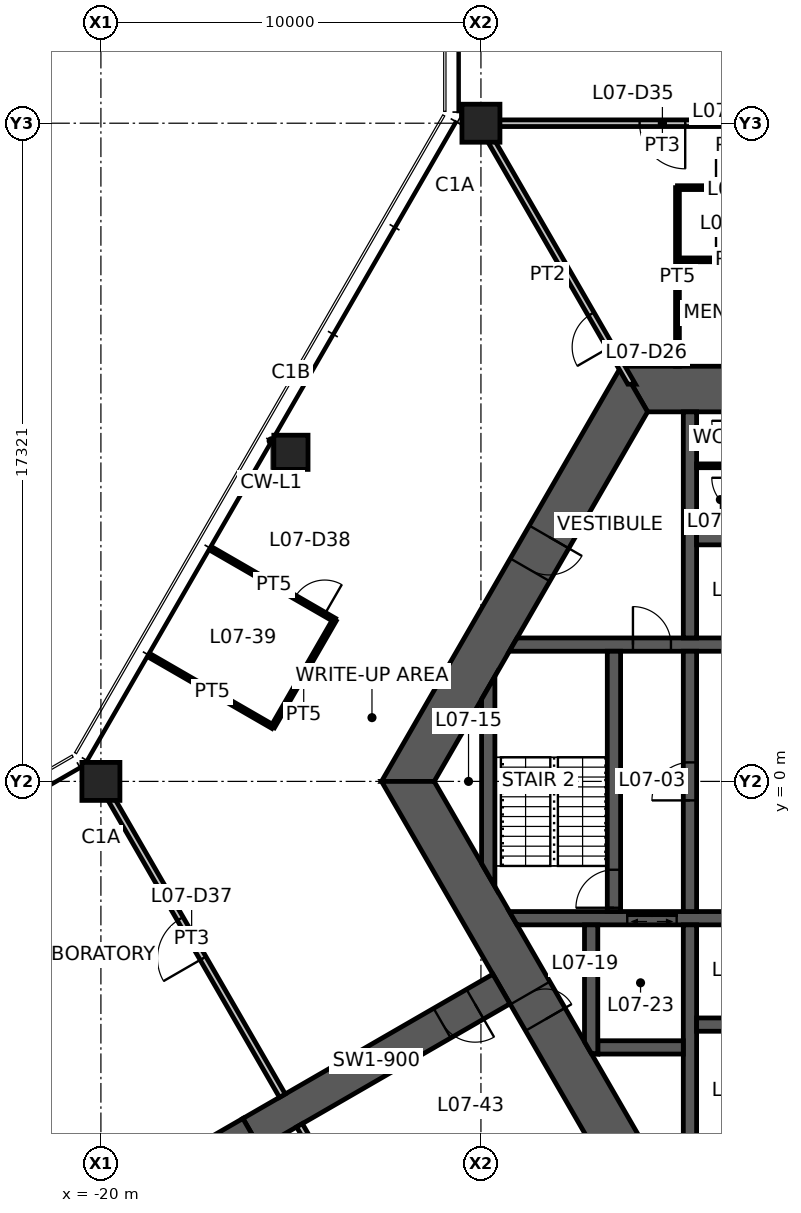
"""IFC4 building model, lengths in metres.
Left out: names, types, materials, properties, quantities, classifications, styles, units other than length and angle.
Written with IfcOpenShell. Run it as: python <this file> out.ifc"""

import sys

from ifc_helpers import new_model, si_unit, direction, frame, frame_2d, origin, origin_2d, place, context, subcontext, project, spatial, polyline, rectangle, hollow_rectangle, outline, extrude, element, fill, save


model = new_model("IFC4")
c1 = context("Model", 3, precision=1e-05, world=origin(), true_north=direction((0.0, 1.0)))
c2 = subcontext(c1, "Body", "Model", "MODEL_VIEW")
j1 = project(units=[si_unit("LENGTHUNIT", "METRE"), si_unit("PLANEANGLEUNIT", "RADIAN")], contexts=[c1])
p1 = place(None, origin())
s1 = spatial("IfcSite", under=j1, at=p1, CompositionType="ELEMENT")
p2 = place(p1, origin())
s2 = spatial("IfcBuilding", under=s1, at=p2, CompositionType="ELEMENT")
p3 = place(p2, frame((0.0, 0.0, 26.8)))
s3 = spatial("IfcBuildingStorey", under=s2, at=p3, CompositionType="ELEMENT", Elevation=26.8)
for number, where, z_axis, x_axis in (
    (1, (-10.0, 17.321, 0.0), (0.0, 0.0, 1.0), (1.0, 0.0, 0.0)),
    (2, (-20.0, 0.0, 0.0), (0.0, 0.0, 1.0), (1.0, 0.0, 0.0)),
):
    element("IfcColumn", number, at=place(p3, frame(where, z_axis=z_axis, x_axis=x_axis)), inside=s3, PredefinedType="COLUMN", context=c2, shape_type="SweptSolid", body=[
        extrude(hollow_rectangle(XDim=1.0, YDim=1.0, WallThickness=0.06, at=origin_2d()), origin(), (0.0, 0.0, 1.0), 4.2),
    ])
p4 = place(p3, frame((-15.0, 8.66, 0.0), z_axis=(0.0, 0.0, 1.0), x_axis=(1.0, 0.0, 0.0)))
e3 = element("IfcColumn", 3, at=p4, inside=s3, PredefinedType="COLUMN", context=c2, shape_type="SweptSolid", body=[
    extrude(hollow_rectangle(XDim=0.9, YDim=0.9, WallThickness=0.05, at=origin_2d()), origin(), (0.0, 0.0, 1.0), 4.2),
])
p5 = place(p3, frame((5.961, 10.325, 0.0), z_axis=(0.0, 0.0, 1.0), x_axis=(-1.0, 0.0, 0.0)))
e4 = element("IfcWall", 4, at=p5, inside=s3, PredefinedType="SHEAR", context=c2, shape_type="SweptSolid", body=[
    extrude(outline(polyline([(-0.346, -0.6), (4.574, -0.6), (5.474, -0.6), (6.449, -0.6), (7.349, -0.6), (12.269, -0.6), (11.576, 0.6), (7.349, 0.6), (6.449, 0.6), (5.474, 0.6), (4.574, 0.6), (0.346, 0.6), (-0.346, -0.6)])), origin(), (0.0, 0.0, 1.0), 4.2),
])
p6 = place(p5, frame((6.449, 0.0, 0.0)))
e5 = element("IfcOpeningElement", 5, at=p6, cuts=e4, PredefinedType="OPENING", context=c2, shape_type="SweptSolid", body=[
    extrude(rectangle(XDim=0.9, YDim=2.1, at=frame_2d((0.45, 1.05))), frame((0.0, 0.61, 0.0), z_axis=(0.0, -1.0, 0.0), x_axis=(1.0, 0.0, 0.0)), (0.0, 0.0, 1.0), 1.22),
])
p7 = place(p5, frame((4.574, 0.0, 0.0)))
e6 = element("IfcOpeningElement", 6, at=p7, cuts=e4, PredefinedType="OPENING", context=c2, shape_type="SweptSolid", body=[
    extrude(rectangle(XDim=0.9, YDim=2.1, at=frame_2d((0.45, 1.05))), frame((0.0, 0.61, 0.0), z_axis=(0.0, -1.0, 0.0), x_axis=(1.0, 0.0, 0.0)), (0.0, 0.0, 1.0), 1.22),
])
p8 = place(p3, frame((-5.961, 10.325, 0.0), z_axis=(0.0, 0.0, 1.0), x_axis=(-0.500004296715, -0.866022923061, 0.0)))
e7 = element("IfcWall", 7, at=p8, inside=s3, PredefinedType="SHEAR", context=c2, shape_type="SweptSolid", body=[
    extrude(outline(polyline([(-0.346, -0.6), (4.494, -0.6), (5.494, -0.6), (12.269, -0.6), (11.576, 0.6), (5.494, 0.6), (4.494, 0.6), (0.346, 0.6), (-0.346, -0.6)])), origin(), (0.0, 0.0, 1.0), 4.2),
])
p9 = place(p8, frame((4.494, 0.0, 0.0)))
e8 = element("IfcOpeningElement", 8, at=p9, cuts=e7, PredefinedType="OPENING", context=c2, shape_type="SweptSolid", body=[
    extrude(rectangle(XDim=1.0, YDim=2.1, at=frame_2d((0.5, 1.05))), frame((0.0, 0.61, 0.0), z_axis=(0.0, -1.0, 0.0), x_axis=(1.0, 0.0, 0.0)), (0.0, 0.0, 1.0), 1.22),
])
p10 = place(p3, frame((-11.922, 0.0, 0.0), z_axis=(0.0, 0.0, 1.0), x_axis=(0.500004296715, -0.866022923061, 0.0)))
e9 = element("IfcWall", 9, at=p10, inside=s3, PredefinedType="SHEAR", context=c2, shape_type="SweptSolid", body=[
    extrude(outline(polyline([(-0.346, -0.6), (6.431, -0.6), (7.231, -0.6), (12.269, -0.6), (11.576, 0.6), (7.231, 0.6), (6.431, 0.6), (0.346, 0.6), (-0.346, -0.6)])), origin(), (0.0, 0.0, 1.0), 4.2),
])
p11 = place(p10, frame((6.431, 0.0, 0.0)))
e10 = element("IfcOpeningElement", 10, at=p11, cuts=e9, PredefinedType="OPENING", context=c2, shape_type="SweptSolid", body=[
    extrude(rectangle(XDim=0.8, YDim=2.1, at=frame_2d((0.4, 1.05))), frame((0.0, 0.61, 0.0), z_axis=(0.0, -1.0, 0.0), x_axis=(1.0, 0.0, 0.0)), (0.0, 0.0, 1.0), 1.22),
])
p12 = place(p3, frame((-9.461, -5.462, 0.0), z_axis=(0.0, 0.0, 1.0), x_axis=(-0.866019116917, -0.500010889016, 0.0)))
e11 = element("IfcWall", 11, at=p12, inside=s3, PredefinedType="SHEAR", context=c2, shape_type="SweptSolid", body=[
    extrude(rectangle(XDim=7.595, YDim=0.9, at=frame_2d((3.798, 0.0))), origin(), (0.0, 0.0, 1.0), 4.2),
])
p13 = place(p12, frame((0.8, 0.0, 0.0)))
e12 = element("IfcOpeningElement", 12, at=p13, cuts=e11, PredefinedType="OPENING", context=c2, shape_type="SweptSolid", body=[
    extrude(rectangle(XDim=1.0, YDim=2.1, at=frame_2d((0.5, 1.05))), frame((0.0, 0.46, 0.0), z_axis=(0.0, -1.0, 0.0), x_axis=(1.0, 0.0, 0.0)), (0.0, 0.0, 1.0), 0.92),
])
p14 = place(p3, frame((-16.039, -9.26, 0.0), z_axis=(0.0, 0.0, 1.0), x_axis=(-0.866024837091, -0.50000098154, 0.0)))
e13 = element("IfcWall", 13, at=p14, inside=s3, PredefinedType="SHEAR", context=c2, shape_type="SweptSolid", body=[
    extrude(rectangle(XDim=13.0, YDim=0.9, at=frame_2d((6.5, 0.0))), origin(), (0.0, 0.0, 1.0), 4.2),
])
p15 = place(p3, frame((-9.151, 3.6, 0.0), z_axis=(0.0, 0.0, 1.0), x_axis=(1.0, 0.0, 0.0)))
e14 = element("IfcWall", 14, at=p15, inside=s3, PredefinedType="SHEAR", context=c2, shape_type="SweptSolid", body=[
    extrude(outline(polyline([(-0.101, -0.175), (3.151, -0.175), (4.151, -0.175), (7.726, -0.175), (7.726, 0.175), (4.151, 0.175), (3.151, 0.175), (0.101, 0.175), (-0.101, -0.175)])), origin(), (0.0, 0.0, 1.0), 4.2),
])
p16 = place(p15, frame((3.151, 0.0, 0.0)))
e15 = element("IfcOpeningElement", 15, at=p16, cuts=e14, PredefinedType="OPENING", context=c2, shape_type="SweptSolid", body=[
    extrude(rectangle(XDim=1.0, YDim=2.1, at=frame_2d((0.5, 1.05))), frame((0.0, 0.185, 0.0), z_axis=(0.0, -1.0, 0.0), x_axis=(1.0, 0.0, 0.0)), (0.0, 0.0, 1.0), 0.37),
])
p17 = place(p3, frame((-9.151, -3.6, 0.0), z_axis=(0.0, 0.0, 1.0), x_axis=(1.0, 0.0, 0.0)))
e16 = element("IfcWall", 16, at=p17, inside=s3, PredefinedType="SHEAR", context=c2, shape_type="SweptSolid", body=[
    extrude(outline(polyline([(0.101, -0.175), (3.001, -0.175), (4.301, -0.175), (7.726, -0.175), (7.726, 0.175), (4.301, 0.175), (3.001, 0.175), (-0.101, 0.175), (0.101, -0.175)])), origin(), (0.0, 0.0, 1.0), 4.2),
])
p18 = place(p17, frame((3.001, 0.0, 0.0)))
e17 = element("IfcOpeningElement", 17, at=p18, cuts=e16, PredefinedType="OPENING", context=c2, shape_type="SweptSolid", body=[
    extrude(rectangle(XDim=1.3, YDim=2.1, at=frame_2d((0.65, 1.05))), frame((0.0, 0.185, 0.0), z_axis=(0.0, -1.0, 0.0), x_axis=(1.0, 0.0, 0.0)), (0.0, 0.0, 1.0), 0.37),
])
p19 = place(p3, frame((-4.5, -3.425, 0.0), z_axis=(0.0, 0.0, 1.0), x_axis=(0.0, 1.0, 0.0)))
e18 = element("IfcWall", 18, at=p19, inside=s3, PredefinedType="SHEAR", context=c2, shape_type="SweptSolid", body=[
    extrude(rectangle(XDim=6.85, YDim=0.35, at=frame_2d((3.425, 0.0))), origin(), (0.0, 0.0, 1.0), 4.2),
])
p20 = place(p19, frame((2.925, 0.0, 0.0)))
e19 = element("IfcOpeningElement", 19, at=p20, cuts=e18, PredefinedType="OPENING", context=c2, shape_type="SweptSolid", body=[
    extrude(rectangle(XDim=1.0, YDim=2.1, at=frame_2d((0.5, 1.05))), frame((0.0, 0.185, 0.0), z_axis=(0.0, -1.0, 0.0), x_axis=(1.0, 0.0, 0.0)), (0.0, 0.0, 1.0), 0.37),
])
p21 = place(p3, frame((-6.5, -3.425, 0.0), z_axis=(0.0, 0.0, 1.0), x_axis=(0.0, 1.0, 0.0)))
e20 = element("IfcWall", 20, at=p21, inside=s3, PredefinedType="SHEAR", context=c2, shape_type="SweptSolid", body=[
    extrude(rectangle(XDim=6.85, YDim=0.35, at=frame_2d((3.425, 0.0))), origin(), (0.0, 0.0, 1.0), 4.2),
])
p22 = place(p21, frame((0.1, 0.0, 0.0)))
e21 = element("IfcOpeningElement", 21, at=p22, cuts=e20, PredefinedType="OPENING", context=c2, shape_type="SweptSolid", body=[
    extrude(rectangle(XDim=1.0, YDim=2.1, at=frame_2d((0.5, 1.05))), frame((0.0, 0.185, 0.0), z_axis=(0.0, -1.0, 0.0), x_axis=(1.0, 0.0, 0.0)), (0.0, 0.0, 1.0), 0.37),
])
for number, where, z_axis, x_axis in (
    (22, (-4.5, 3.775, 0.0), (0.0, 0.0, 1.0), (0.0, 1.0, 0.0)),
    (23, (-4.5, -3.775, 0.0), (0.0, 0.0, 1.0), (0.0, -1.0, 0.0)),
):
    element("IfcWall", number, at=place(p3, frame(where, z_axis=z_axis, x_axis=x_axis)), inside=s3, PredefinedType="SHEAR", context=c2, shape_type="SweptSolid", body=[
        extrude(rectangle(XDim=5.95, YDim=0.35, at=frame_2d((2.975, 0.0))), origin(), (0.0, 0.0, 1.0), 4.2),
    ])
for number, where, z_axis, x_axis in (
    (24, (-4.325, 6.4, 0.0), (0.0, 0.0, 1.0), (1.0, 0.0, 0.0)),
    (25, (-4.325, -6.4, 0.0), (0.0, 0.0, 1.0), (1.0, 0.0, 0.0)),
):
    element("IfcWall", number, at=place(p3, frame(where, z_axis=z_axis, x_axis=x_axis)), inside=s3, PredefinedType="SHEAR", context=c2, shape_type="SweptSolid", body=[
        extrude(rectangle(XDim=2.55, YDim=0.35, at=frame_2d((1.275, 0.0))), origin(), (0.0, 0.0, 1.0), 4.2),
    ])
p23 = place(p3, frame((-6.925, -7.0, 0.0), z_axis=(0.0, 0.0, 1.0), x_axis=(1.0, 0.0, 0.0)))
e26 = element("IfcWall", 26, at=p23, inside=s3, PredefinedType="SHEAR", context=c2, shape_type="SweptSolid", body=[
    extrude(rectangle(XDim=2.25, YDim=0.35, at=frame_2d((1.125, 0.0))), origin(), (0.0, 0.0, 1.0), 4.2),
])
p24 = place(p3, frame((-7.1, -3.775, 0.0), z_axis=(0.0, 0.0, 1.0), x_axis=(0.0, -1.0, 0.0)))
e27 = element("IfcWall", 27, at=p24, inside=s3, PredefinedType="SHEAR", context=c2, shape_type="SweptSolid", body=[
    extrude(outline(polyline([(0.0, -0.175), (3.074, -0.175), (3.377, 0.0), (3.4, 0.175), (0.0, 0.175), (0.0, -0.175)])), origin(), (0.0, 0.0, 1.0), 4.2),
])
p25 = place(p3, frame((-9.808, -2.462, 0.0), z_axis=(0.0, 0.0, 1.0), x_axis=(0.0, 1.0, 0.0)))
e28 = element("IfcWall", 28, at=p25, inside=s3, PredefinedType="SHEAR", context=c2, shape_type="SweptSolid", body=[
    extrude(outline(polyline([(-0.303, -0.175), (5.228, -0.175), (4.621, 0.175), (0.303, 0.175), (-0.303, -0.175)])), origin(), (0.0, 0.0, 1.0), 4.2),
])
p26 = place(p3, frame((-4.325, 6.7, 0.0), z_axis=(0.0, 0.0, 1.0), x_axis=(1.0, 0.0, 0.0)))
e29 = element("IfcWall", 29, at=p26, inside=s3, PredefinedType="PLUMBINGWALL", context=c2, shape_type="SweptSolid", body=[
    extrude(rectangle(XDim=2.55, YDim=0.25, at=frame_2d((1.275, 0.0))), origin(), (0.0, 0.0, 1.0), 4.2),
])
p27 = place(p3, frame((-3.075, 8.305, 0.0), z_axis=(0.0, 0.0, 1.0), x_axis=(-1.0, 0.0, 0.0)))
e30 = element("IfcWall", 30, at=p27, inside=s3, PredefinedType="PARTITIONING", context=c2, shape_type="SweptSolid", body=[
    extrude(rectangle(XDim=1.25, YDim=0.1, at=frame_2d((0.625, 0.0))), origin(), (0.0, 0.0, 1.0), 3.23),
])
p28 = place(p3, frame((-6.035, 10.453, 0.0), z_axis=(0.0, 0.0, 1.0), x_axis=(-0.499993402427, 0.866029212861, 0.0)))
e31 = element("IfcWall", 31, at=p28, inside=s3, PredefinedType="PARTITIONING", context=c2, shape_type="SweptSolid", body=[
    extrude(outline(polyline([(-0.051, -0.087), (1.129, -0.087), (2.129, -0.087), (7.93, -0.087), (7.93, 0.087), (2.129, 0.087), (1.129, 0.087), (0.051, 0.087), (-0.051, -0.087)])), origin(), (0.0, 0.0, 1.0), 3.33),
])
p29 = place(p28, frame((1.129, 0.0, 0.0)))
e32 = element("IfcOpeningElement", 32, at=p29, cuts=e31, PredefinedType="OPENING", context=c2, shape_type="SweptSolid", body=[
    extrude(rectangle(XDim=1.0, YDim=2.1, at=frame_2d((0.5, 1.05))), frame((0.0, 0.098, 0.0), z_axis=(0.0, -1.0, 0.0), x_axis=(1.0, 0.0, 0.0)), (0.0, 0.0, 1.0), 0.195),
])
p30 = place(p3, frame((-4.829, 13.725, 0.0), z_axis=(0.0, 0.0, 1.0), x_axis=(1.0, 0.0, 0.0)))
e33 = element("IfcWall", 33, at=p30, inside=s3, PredefinedType="PARTITIONING", context=c2, shape_type="SweptSolid", body=[
    extrude(rectangle(XDim=2.929, YDim=0.1, at=frame_2d((1.464, 0.0))), origin(), (0.0, 0.0, 1.0), 3.23),
])
p31 = place(p30, frame((1.014, 0.0, 0.0)))
e34 = element("IfcOpeningElement", 34, at=p31, cuts=e33, PredefinedType="OPENING", context=c2, shape_type="SweptSolid", body=[
    extrude(rectangle(XDim=0.9, YDim=2.1, at=frame_2d((0.45, 1.05))), frame((0.0, 0.06, 0.0), z_axis=(0.0, -1.0, 0.0), x_axis=(1.0, 0.0, 0.0)), (0.0, 0.0, 1.0), 0.12),
])
p32 = place(p3, frame((-4.829, 15.625, 0.0), z_axis=(0.0, 0.0, 1.0), x_axis=(1.0, 0.0, 0.0)))
e35 = element("IfcWall", 35, at=p32, inside=s3, PredefinedType="PARTITIONING", context=c2, shape_type="SweptSolid", body=[
    extrude(rectangle(XDim=2.929, YDim=0.1, at=frame_2d((1.464, 0.0))), origin(), (0.0, 0.0, 1.0), 3.23),
])
p33 = place(p32, frame((1.014, 0.0, 0.0)))
e36 = element("IfcOpeningElement", 36, at=p33, cuts=e35, PredefinedType="OPENING", context=c2, shape_type="SweptSolid", body=[
    extrude(rectangle(XDim=0.9, YDim=2.1, at=frame_2d((0.45, 1.05))), frame((0.0, 0.06, 0.0), z_axis=(0.0, -1.0, 0.0), x_axis=(1.0, 0.0, 0.0)), (0.0, 0.0, 1.0), 0.12),
])
p34 = place(p3, frame((-4.829, 10.925, 0.0), z_axis=(0.0, 0.0, 1.0), x_axis=(0.0, 1.0, 0.0)))
e37 = element("IfcWall", 37, at=p34, inside=s3, PredefinedType="PARTITIONING", context=c2, shape_type="SweptSolid", body=[
    extrude(rectangle(XDim=4.7, YDim=0.1, at=frame_2d((2.35, 0.0))), origin(), (0.0, 0.0, 1.0), 3.23),
])
p35 = place(p3, frame((-0.45, 17.321, 0.0), z_axis=(0.0, 0.0, 1.0), x_axis=(-1.0, 0.0, 0.0)))
e38 = element("IfcWall", 38, at=p35, inside=s3, PredefinedType="PARTITIONING", context=c2, shape_type="SweptSolid", body=[
    extrude(rectangle(XDim=9.55, YDim=0.175, at=frame_2d((4.775, 0.0))), origin(), (0.0, 0.0, 1.0), 3.238),
])
p36 = place(p35, frame((4.175, 0.0, 0.0)))
e39 = element("IfcOpeningElement", 39, at=p36, cuts=e38, PredefinedType="OPENING", context=c2, shape_type="SweptSolid", body=[
    extrude(rectangle(XDim=1.2, YDim=2.1, at=frame_2d((0.6, 1.05))), frame((0.0, 0.098, 0.0), z_axis=(0.0, -1.0, 0.0), x_axis=(1.0, 0.0, 0.0)), (0.0, 0.0, 1.0), 0.195),
])
p37 = place(p3, frame((-15.225, -8.271, 0.0), z_axis=(0.0, 0.0, 1.0), x_axis=(-0.499993908199, 0.866028920859, 0.0)))
e40 = element("IfcWall", 40, at=p37, inside=s3, PredefinedType="PARTITIONING", context=c2, shape_type="SweptSolid", body=[
    extrude(rectangle(XDim=9.55, YDim=0.175, at=frame_2d((4.775, 0.0))), origin(), (0.0, 0.0, 1.0), 3.238),
])
p38 = place(p37, frame((4.175, 0.0, 0.0)))
e41 = element("IfcOpeningElement", 41, at=p38, cuts=e40, PredefinedType="OPENING", context=c2, shape_type="SweptSolid", body=[
    extrude(rectangle(XDim=1.2, YDim=2.1, at=frame_2d((0.6, 1.05))), frame((0.0, 0.098, 0.0), z_axis=(0.0, -1.0, 0.0), x_axis=(1.0, 0.0, 0.0)), (0.0, 0.0, 1.0), 0.195),
])
p39 = place(p3, frame((-17.048, 6.094, 0.0), z_axis=(0.0, 0.0, 1.0), x_axis=(0.866040157966, -0.499974444137, 0.0)))
e42 = element("IfcWall", 42, at=p39, inside=s3, PredefinedType="PARTITIONING", context=c2, shape_type="SweptSolid", body=[
    extrude(rectangle(XDim=3.69, YDim=0.1, at=frame_2d((1.845, 0.0))), origin(), (0.0, 0.0, 1.0), 3.23),
])
p40 = place(p39, frame((2.49, 0.0, 0.0)))
e43 = element("IfcOpeningElement", 43, at=p40, cuts=e42, PredefinedType="OPENING", context=c2, shape_type="SweptSolid", body=[
    extrude(rectangle(XDim=0.9, YDim=2.1, at=frame_2d((0.45, 1.05))), frame((0.0, 0.06, 0.0), z_axis=(0.0, -1.0, 0.0), x_axis=(1.0, 0.0, 0.0)), (0.0, 0.0, 1.0), 0.12),
])
p41 = place(p3, frame((-15.475, 1.437, 0.0), z_axis=(0.0, 0.0, 1.0), x_axis=(-0.866017659399, 0.500013413428, 0.0)))
e44 = element("IfcWall", 44, at=p41, inside=s3, PredefinedType="PARTITIONING", context=c2, shape_type="SweptSolid", body=[
    extrude(rectangle(XDim=3.68, YDim=0.1, at=frame_2d((1.84, 0.0))), origin(), (0.0, 0.0, 1.0), 3.23),
])
p42 = place(p3, frame((-13.852, 4.249, 0.0), z_axis=(0.0, 0.0, 1.0), x_axis=(-0.500013214685, -0.866017774148, 0.0)))
e45 = element("IfcWall", 45, at=p42, inside=s3, PredefinedType="PARTITIONING", context=c2, shape_type="SweptSolid", body=[
    extrude(rectangle(XDim=3.247, YDim=0.1, at=frame_2d((1.623, 0.0))), origin(), (0.0, 0.0, 1.0), 3.23),
])
p43 = place(p3, frame((-14.775, -9.05, 0.0), z_axis=(0.0, 0.0, 1.0), x_axis=(0.499993908199, -0.866028920859, 0.0)))
e46 = element("IfcWall", 46, at=p43, inside=s3, PredefinedType="PARTITIONING", context=c2, shape_type="SweptSolid", body=[
    extrude(rectangle(XDim=9.55, YDim=0.175, at=frame_2d((4.775, 0.0))), origin(), (0.0, 0.0, 1.0), 3.238),
])
p44 = place(p43, frame((4.175, 0.0, 0.0)))
e47 = element("IfcOpeningElement", 47, at=p44, cuts=e46, PredefinedType="OPENING", context=c2, shape_type="SweptSolid", body=[
    extrude(rectangle(XDim=1.2, YDim=2.1, at=frame_2d((0.6, 1.05))), frame((0.0, 0.098, 0.0), z_axis=(0.0, -1.0, 0.0), x_axis=(1.0, 0.0, 0.0)), (0.0, 0.0, 1.0), 0.195),
])
p45 = place(p11, origin())
e48 = element("IfcDoor", 48, at=p45, inside=s3, OperationType="SINGLE_SWING_RIGHT", PredefinedType="DOOR", context=c2, shape_type="SweptSolid", body=[
    extrude(rectangle(XDim=0.8, YDim=2.1, at=frame_2d((0.4, 1.05))), frame((0.0, 0.025, 0.0), z_axis=(0.0, -1.0, 0.0), x_axis=(1.0, 0.0, 0.0)), (0.0, 0.0, 1.0), 0.05),
])
fill(e10, e48)
p46 = place(p9, origin())
e49 = element("IfcDoor", 49, at=p46, inside=s3, OperationType="SINGLE_SWING_LEFT", PredefinedType="DOOR", context=c2, shape_type="SweptSolid", body=[
    extrude(rectangle(XDim=1.0, YDim=2.1, at=frame_2d((0.5, 1.05))), frame((0.0, 0.025, 0.0), z_axis=(0.0, -1.0, 0.0), x_axis=(1.0, 0.0, 0.0)), (0.0, 0.0, 1.0), 0.05),
])
fill(e8, e49)
p47 = place(p20, origin())
e50 = element("IfcDoor", 50, at=p47, inside=s3, OperationType="SINGLE_SWING_LEFT", PredefinedType="DOOR", context=c2, shape_type="SweptSolid", body=[
    extrude(rectangle(XDim=1.0, YDim=2.1, at=frame_2d((0.5, 1.05))), frame((0.0, 0.025, 0.0), z_axis=(0.0, -1.0, 0.0), x_axis=(1.0, 0.0, 0.0)), (0.0, 0.0, 1.0), 0.05),
])
fill(e19, e50)
p48 = place(p22, origin())
e51 = element("IfcDoor", 51, at=p48, inside=s3, OperationType="SINGLE_SWING_LEFT", PredefinedType="DOOR", context=c2, shape_type="SweptSolid", body=[
    extrude(rectangle(XDim=1.0, YDim=2.1, at=frame_2d((0.5, 1.05))), frame((0.0, 0.025, 0.0), z_axis=(0.0, -1.0, 0.0), x_axis=(1.0, 0.0, 0.0)), (0.0, 0.0, 1.0), 0.05),
])
fill(e21, e51)
p49 = place(p16, origin())
e52 = element("IfcDoor", 52, at=p49, inside=s3, OperationType="SINGLE_SWING_LEFT", PredefinedType="DOOR", context=c2, shape_type="SweptSolid", body=[
    extrude(rectangle(XDim=1.0, YDim=2.1, at=frame_2d((0.5, 1.05))), frame((0.0, 0.025, 0.0), z_axis=(0.0, -1.0, 0.0), x_axis=(1.0, 0.0, 0.0)), (0.0, 0.0, 1.0), 0.05),
])
fill(e15, e52)
p50 = place(p13, origin())
e53 = element("IfcDoor", 53, at=p50, inside=s3, OperationType="SINGLE_SWING_LEFT", PredefinedType="DOOR", context=c2, shape_type="SweptSolid", body=[
    extrude(rectangle(XDim=1.0, YDim=2.1, at=frame_2d((0.5, 1.05))), frame((0.0, 0.025, 0.0), z_axis=(0.0, -1.0, 0.0), x_axis=(1.0, 0.0, 0.0)), (0.0, 0.0, 1.0), 0.05),
])
fill(e12, e53)
p51 = place(p29, origin())
e54 = element("IfcDoor", 54, at=p51, inside=s3, OperationType="SINGLE_SWING_LEFT", PredefinedType="DOOR", context=c2, shape_type="SweptSolid", body=[
    extrude(rectangle(XDim=1.0, YDim=2.1, at=frame_2d((0.5, 1.05))), frame((0.0, 0.025, 0.0), z_axis=(0.0, -1.0, 0.0), x_axis=(1.0, 0.0, 0.0)), (0.0, 0.0, 1.0), 0.05),
])
fill(e32, e54)
p52 = place(p31, origin())
e55 = element("IfcDoor", 55, at=p52, inside=s3, OperationType="SINGLE_SWING_LEFT", PredefinedType="DOOR", context=c2, shape_type="SweptSolid", body=[
    extrude(rectangle(XDim=0.9, YDim=2.1, at=frame_2d((0.45, 1.05))), frame((0.0, 0.025, 0.0), z_axis=(0.0, -1.0, 0.0), x_axis=(1.0, 0.0, 0.0)), (0.0, 0.0, 1.0), 0.05),
])
fill(e34, e55)
p53 = place(p33, origin())
e56 = element("IfcDoor", 56, at=p53, inside=s3, OperationType="SINGLE_SWING_LEFT", PredefinedType="DOOR", context=c2, shape_type="SweptSolid", body=[
    extrude(rectangle(XDim=0.9, YDim=2.1, at=frame_2d((0.45, 1.05))), frame((0.0, 0.025, 0.0), z_axis=(0.0, -1.0, 0.0), x_axis=(1.0, 0.0, 0.0)), (0.0, 0.0, 1.0), 0.05),
])
fill(e36, e56)
p54 = place(p36, origin())
e57 = element("IfcDoor", 57, at=p54, inside=s3, OperationType="DOUBLE_DOOR_SINGLE_SWING", PredefinedType="DOOR", context=c2, shape_type="SweptSolid", body=[
    extrude(rectangle(XDim=1.2, YDim=2.1, at=frame_2d((0.6, 1.05))), frame((0.0, 0.025, 0.0), z_axis=(0.0, -1.0, 0.0), x_axis=(1.0, 0.0, 0.0)), (0.0, 0.0, 1.0), 0.05),
])
fill(e39, e57)
p55 = place(p38, origin())
e58 = element("IfcDoor", 58, at=p55, inside=s3, OperationType="DOUBLE_DOOR_SINGLE_SWING", PredefinedType="DOOR", context=c2, shape_type="SweptSolid", body=[
    extrude(rectangle(XDim=1.2, YDim=2.1, at=frame_2d((0.6, 1.05))), frame((0.0, 0.025, 0.0), z_axis=(0.0, -1.0, 0.0), x_axis=(1.0, 0.0, 0.0)), (0.0, 0.0, 1.0), 0.05),
])
fill(e41, e58)
p56 = place(p40, origin())
e59 = element("IfcDoor", 59, at=p56, inside=s3, OperationType="SINGLE_SWING_RIGHT", PredefinedType="DOOR", context=c2, shape_type="SweptSolid", body=[
    extrude(rectangle(XDim=0.9, YDim=2.1, at=frame_2d((0.45, 1.05))), frame((0.0, 0.025, 0.0), z_axis=(0.0, -1.0, 0.0), x_axis=(1.0, 0.0, 0.0)), (0.0, 0.0, 1.0), 0.05),
])
fill(e43, e59)
p57 = place(p18, origin())
e60 = element("IfcDoor", 60, at=p57, inside=s3, OperationType="DOUBLE_DOOR_SLIDING", PredefinedType="DOOR", context=c2, shape_type="SweptSolid", body=[
    extrude(rectangle(XDim=1.3, YDim=2.1, at=frame_2d((0.65, 1.05))), frame((0.0, 0.025, 0.0), z_axis=(0.0, -1.0, 0.0), x_axis=(1.0, 0.0, 0.0)), (0.0, 0.0, 1.0), 0.05),
])
fill(e17, e60)
save(model, sys.argv[1])
